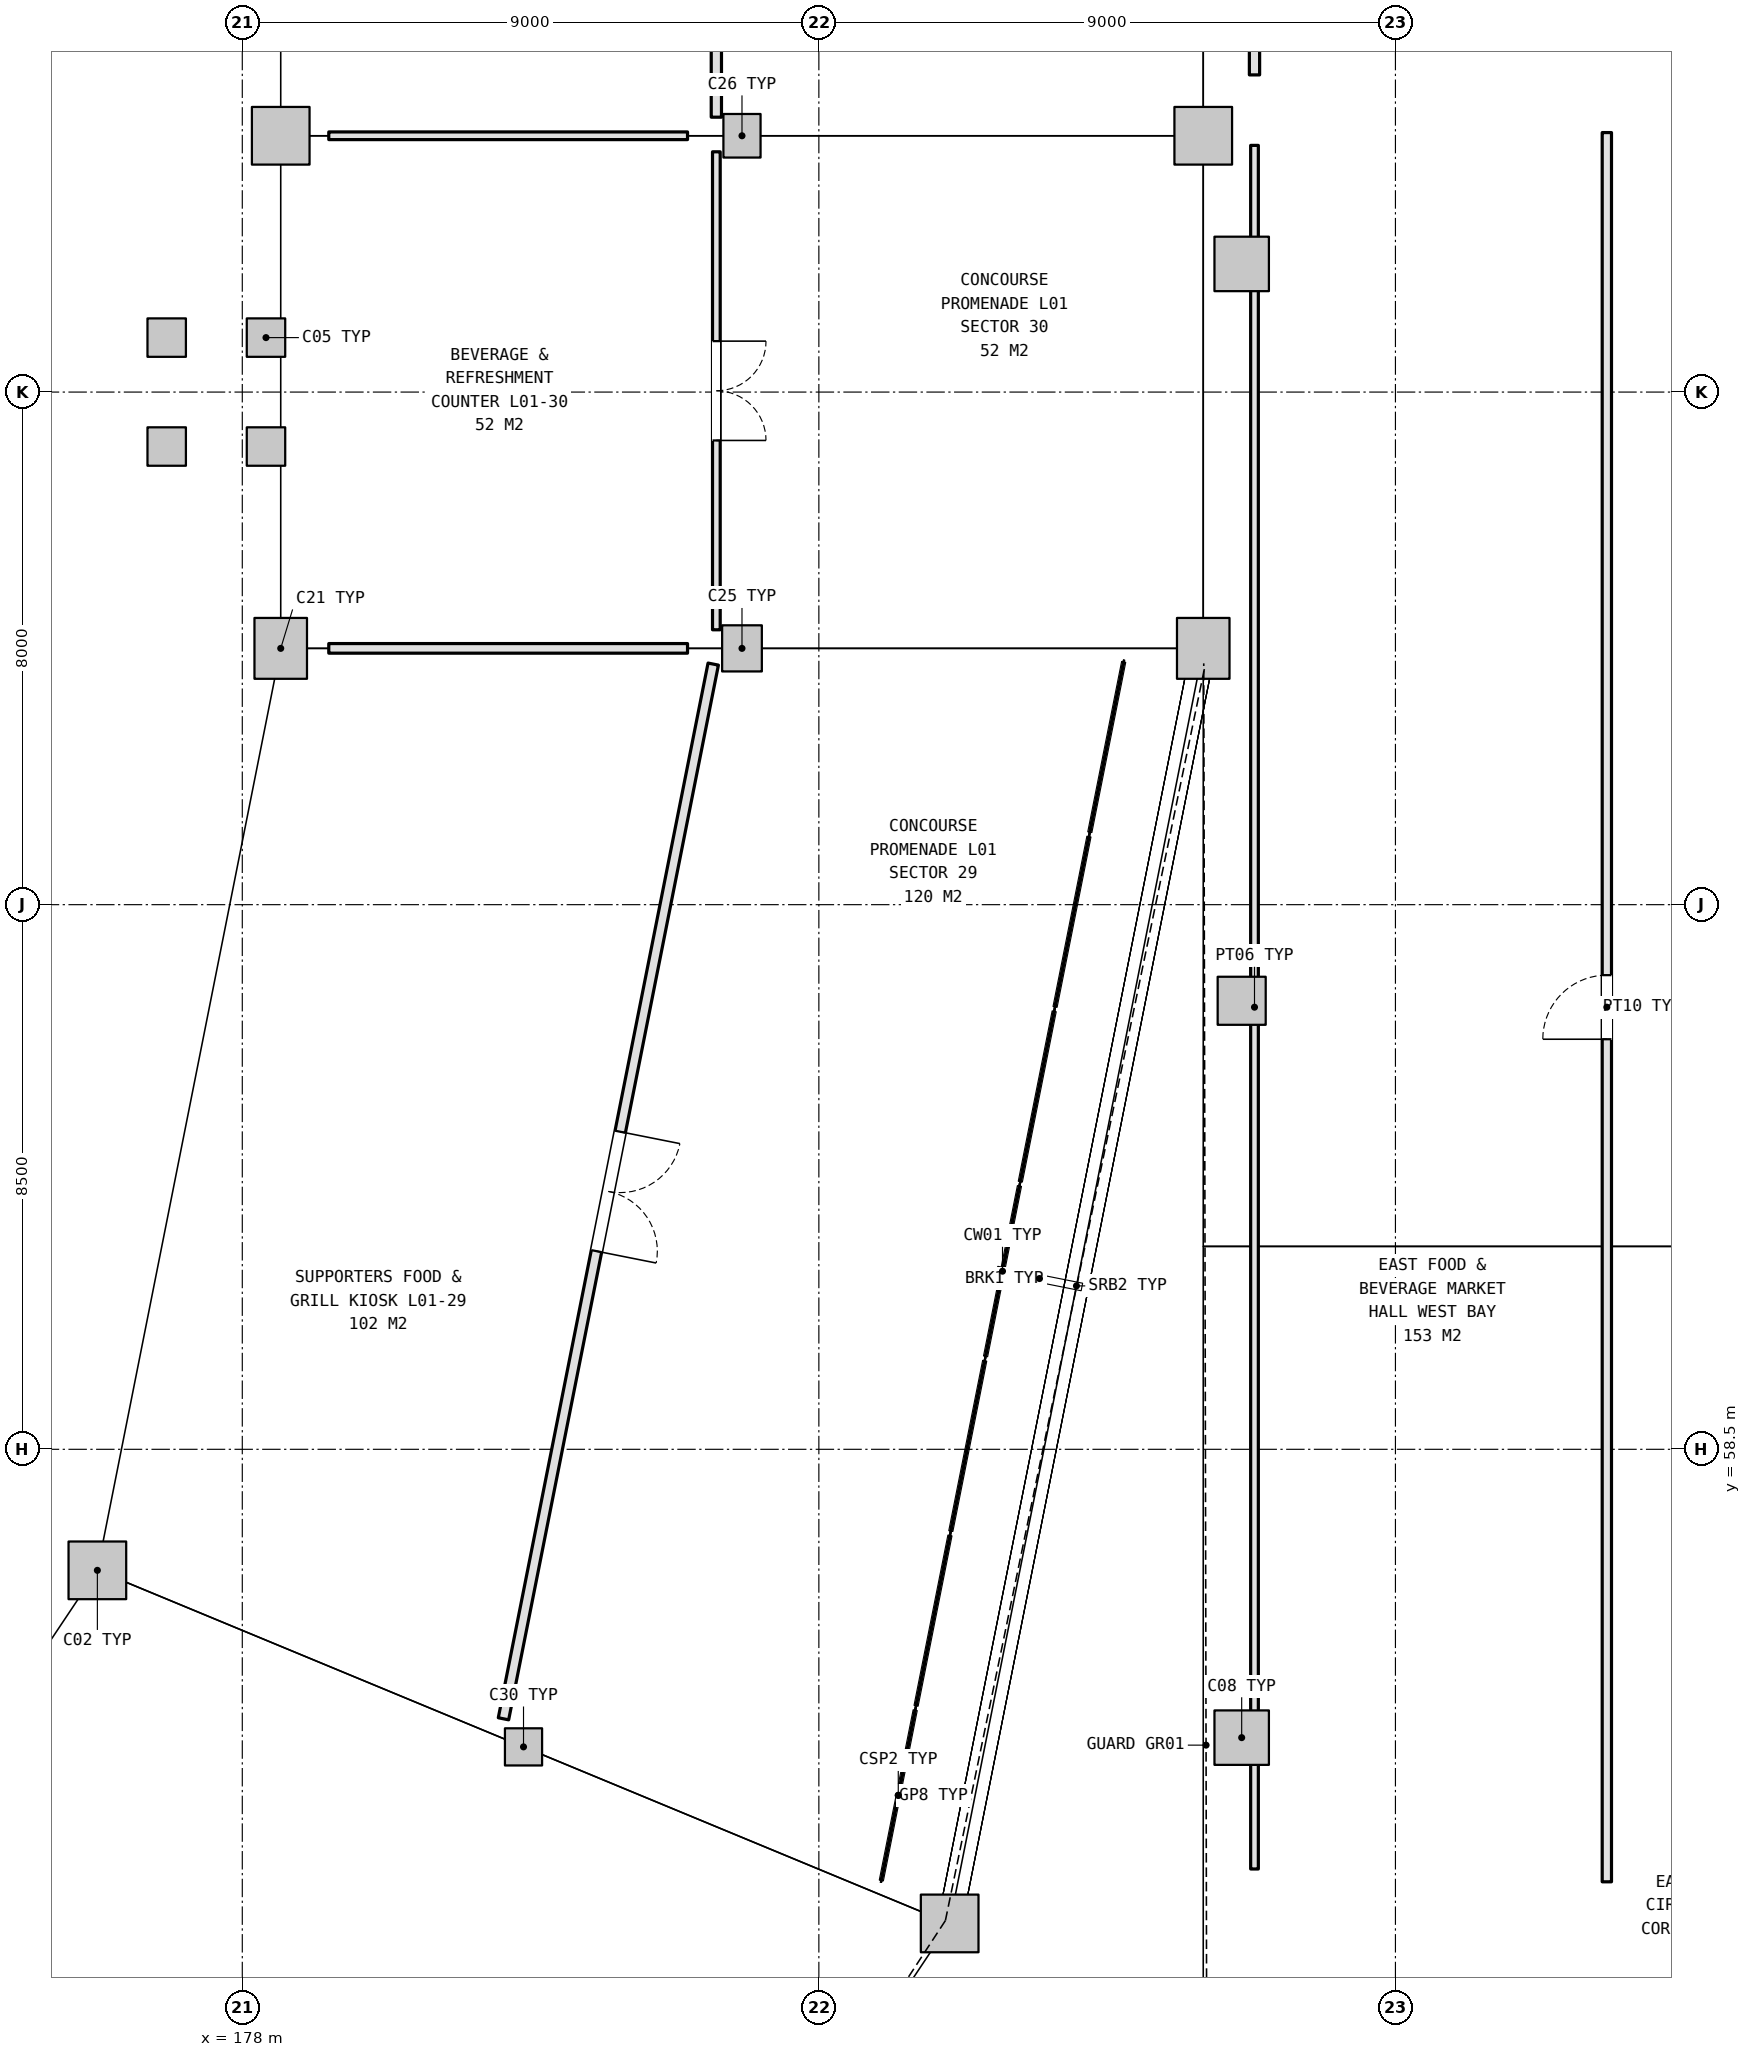
"""IFC4 building model, lengths in metres.
Left out: names, types, materials, properties, quantities, classifications, styles, units other than length and angle.
Written with IfcOpenShell. Run it as: python <this file> out.ifc"""

import sys

from ifc_helpers import new_model, si_unit, direction, frame, frame_2d, origin, origin_2d, place, context, subcontext, project, spatial, rectangle, extrude, element, fill, save


model = new_model("IFC4")
c1 = context("Model", 3, precision=1e-05, world=origin(), true_north=direction((0.0, 1.0)))
c2 = subcontext(c1, "Body", "Model", "MODEL_VIEW")
j1 = project(units=[si_unit("LENGTHUNIT", "METRE"), si_unit("PLANEANGLEUNIT", "RADIAN")], contexts=[c1])
p1 = place(None, origin())
s1 = spatial("IfcSite", under=j1, at=p1, CompositionType="ELEMENT")
p2 = place(p1, origin())
s2 = spatial("IfcBuilding", under=s1, at=p2, CompositionType="ELEMENT")
p3 = place(p2, frame((0.0, 0.0, 5.4)))
s3 = spatial("IfcBuildingStorey", under=s2, at=p3, CompositionType="ELEMENT", Elevation=5.4)
p4 = place(p3, frame((175.738, 56.611, 0.0), z_axis=(0.0, 0.0, 1.0), x_axis=(1.0, 0.0, 0.0)))
e1 = element("IfcColumn", 1, at=p4, inside=s3, PredefinedType="COLUMN", context=c2, shape_type="SweptSolid", body=[
    extrude(rectangle(XDim=0.9, YDim=0.9, at=origin_2d()), origin(), (0.0, 0.0, 1.0), 5.4),
])
p5 = place(p3, frame((182.39, 53.856, 0.0), z_axis=(0.0, 0.0, 1.0), x_axis=(1.0, 0.0, 0.0)))
e2 = element("IfcColumn", 2, at=p5, inside=s3, PredefinedType="COLUMN", context=c2, shape_type="SweptSolid", body=[
    extrude(rectangle(XDim=0.58, YDim=0.58, at=origin_2d()), origin(), (0.0, 0.0, 1.0), 5.4),
])
p6 = place(p3, frame((189.042, 51.1, 0.0), z_axis=(0.0, 0.0, 1.0), x_axis=(1.0, 0.0, 0.0)))
e3 = element("IfcColumn", 3, at=p6, inside=s3, PredefinedType="COLUMN", context=c2, shape_type="SweptSolid", body=[
    extrude(rectangle(XDim=0.9, YDim=0.9, at=origin_2d()), origin(), (0.0, 0.0, 1.0), 5.4),
])
p7 = place(p3, frame((178.6, 71.0, 0.0), z_axis=(0.0, 0.0, 1.0), x_axis=(1.0, 0.0, 0.0)))
e4 = element("IfcColumn", 4, at=p7, inside=s3, PredefinedType="COLUMN", context=c2, shape_type="SweptSolid", body=[
    extrude(rectangle(XDim=0.82, YDim=0.95, at=origin_2d()), origin(), (0.0, 0.0, 1.0), 5.4),
])
p8 = place(p3, frame((185.8, 71.0, 0.0), z_axis=(0.0, 0.0, 1.0), x_axis=(1.0, 0.0, 0.0)))
e5 = element("IfcColumn", 5, at=p8, inside=s3, PredefinedType="COLUMN", context=c2, shape_type="SweptSolid", body=[
    extrude(rectangle(XDim=0.62, YDim=0.72, at=origin_2d()), origin(), (0.0, 0.0, 1.0), 5.4),
])
p9 = place(p3, frame((193.0, 71.0, 0.0), z_axis=(0.0, 0.0, 1.0), x_axis=(1.0, 0.0, 0.0)))
e6 = element("IfcColumn", 6, at=p9, inside=s3, PredefinedType="COLUMN", context=c2, shape_type="SweptSolid", body=[
    extrude(rectangle(XDim=0.82, YDim=0.95, at=origin_2d()), origin(), (0.0, 0.0, 1.0), 5.4),
])
p10 = place(p3, frame((178.6, 79.0, 0.0), z_axis=(0.0, 0.0, 1.0), x_axis=(1.0, 0.0, 0.0)))
e7 = element("IfcColumn", 7, at=p10, inside=s3, PredefinedType="COLUMN", context=c2, shape_type="SweptSolid", body=[
    extrude(rectangle(XDim=0.9, YDim=0.9, at=origin_2d()), origin(), (0.0, 0.0, 1.0), 5.4),
])
p11 = place(p3, frame((185.8, 79.0, 0.0), z_axis=(0.0, 0.0, 1.0), x_axis=(1.0, 0.0, 0.0)))
e8 = element("IfcColumn", 8, at=p11, inside=s3, PredefinedType="COLUMN", context=c2, shape_type="SweptSolid", body=[
    extrude(rectangle(XDim=0.58, YDim=0.68, at=origin_2d()), origin(), (0.0, 0.0, 1.0), 5.4),
])
p12 = place(p3, frame((193.0, 79.0, 0.0), z_axis=(0.0, 0.0, 1.0), x_axis=(1.0, 0.0, 0.0)))
e9 = element("IfcColumn", 9, at=p12, inside=s3, PredefinedType="COLUMN", context=c2, shape_type="SweptSolid", body=[
    extrude(rectangle(XDim=0.9, YDim=0.9, at=origin_2d()), origin(), (0.0, 0.0, 1.0), 5.4),
])
p13 = place(p3, frame((193.6, 54.0, 0.0), z_axis=(0.0, 0.0, 1.0), x_axis=(1.0, 0.0, 0.0)))
e10 = element("IfcColumn", 10, at=p13, inside=s3, PredefinedType="COLUMN", context=c2, shape_type="SweptSolid", body=[
    extrude(rectangle(XDim=0.85, YDim=0.85, at=origin_2d()), origin(), (0.0, 0.0, 1.0), 5.4),
])
p14 = place(p3, frame((193.6, 65.5, 0.0), z_axis=(0.0, 0.0, 1.0), x_axis=(1.0, 0.0, 0.0)))
e11 = element("IfcColumn", 11, at=p14, inside=s3, PredefinedType="COLUMN", context=c2, shape_type="SweptSolid", body=[
    extrude(rectangle(XDim=0.75, YDim=0.75, at=origin_2d()), origin(), (0.0, 0.0, 1.0), 5.4),
])
p15 = place(p3, frame((193.6, 77.0, 0.0), z_axis=(0.0, 0.0, 1.0), x_axis=(1.0, 0.0, 0.0)))
e12 = element("IfcColumn", 12, at=p15, inside=s3, PredefinedType="COLUMN", context=c2, shape_type="SweptSolid", body=[
    extrude(rectangle(XDim=0.85, YDim=0.85, at=origin_2d()), origin(), (0.0, 0.0, 1.0), 5.4),
])
for number, where, z_axis, x_axis in (
    (13, (178.37, 75.85, 0.0), (0.0, 0.0, 1.0), (1.0, 0.0, 0.0)),
    (14, (176.82, 75.85, 0.0), (0.0, 0.0, 1.0), (1.0, 0.0, 0.0)),
    (15, (176.82, 74.15, 0.0), (0.0, 0.0, 1.0), (1.0, 0.0, 0.0)),
    (16, (178.37, 74.15, 0.0), (0.0, 0.0, 1.0), (1.0, 0.0, 0.0)),
):
    element("IfcColumn", number, at=place(p3, frame(where, z_axis=z_axis, x_axis=x_axis)), inside=s3, PredefinedType="COLUMN", context=c2, shape_type="SweptSolid", body=[
        extrude(rectangle(XDim=0.6, YDim=0.6, at=origin_2d()), origin(), (0.0, 0.0, 1.0), 5.4),
    ])
p16 = place(p3, frame((199.3, 79.05, 0.0), z_axis=(0.0, 0.0, 1.0), x_axis=(0.0, -1.0, 0.0)))
e17 = element("IfcWall", 17, at=p16, inside=s3, PredefinedType="PARTITIONING", context=c2, shape_type="SweptSolid", body=[
    extrude(rectangle(XDim=27.3, YDim=0.145, at=frame_2d((13.65, 0.0))), origin(), (0.0, 0.0, 1.0), 4.625),
])
p17 = place(p16, frame((13.15, 0.0, 0.0)))
e18 = element("IfcOpeningElement", 18, at=p17, cuts=e17, PredefinedType="OPENING", context=c2, shape_type="SweptSolid", body=[
    extrude(rectangle(XDim=1.0, YDim=2.15, at=frame_2d((0.5, 1.075))), frame((0.0, 0.083, 0.0), z_axis=(0.0, -1.0, 0.0), x_axis=(1.0, 0.0, 0.0)), (0.0, 0.0, 1.0), 0.165),
])
p18 = place(p3, frame((193.8, 51.95, 0.0), z_axis=(0.0, 0.0, 1.0), x_axis=(0.0, 1.0, 0.0)))
e19 = element("IfcWall", 19, at=p18, inside=s3, PredefinedType="PARTITIONING", context=c2, shape_type="SweptSolid", body=[
    extrude(rectangle(XDim=26.9, YDim=0.12, at=frame_2d((13.45, 0.0))), origin(), (0.0, 0.0, 1.0), 4.475),
])
p19 = place(p3, frame((193.8, 79.95, 0.0), z_axis=(0.0, 0.0, 1.0), x_axis=(0.0, 1.0, 0.0)))
e20 = element("IfcWall", 20, at=p19, inside=s3, PredefinedType="PARTITIONING", context=c2, shape_type="SweptSolid", body=[
    extrude(rectangle(XDim=20.9, YDim=0.16, at=frame_2d((10.45, 0.0))), origin(), (0.0, 0.0, 1.0), 4.475),
])
p20 = place(p3, frame((185.351, 70.755, 0.0), z_axis=(0.0, 0.0, 1.0), x_axis=(-0.195100557291, -0.980783244425, 0.0)))
e21 = element("IfcWall", 21, at=p20, inside=s3, PredefinedType="PARTITIONING", context=c2, shape_type="SweptSolid", body=[
    extrude(rectangle(XDim=16.783, YDim=0.165, at=frame_2d((8.392, 0.0))), origin(), (0.0, 0.0, 1.0), 4.365),
])
p21 = place(p20, frame((7.442, 0.0, 0.0)))
e22 = element("IfcOpeningElement", 22, at=p21, cuts=e21, PredefinedType="OPENING", context=c2, shape_type="SweptSolid", body=[
    extrude(rectangle(XDim=1.9, YDim=2.3, at=frame_2d((0.95, 1.15))), frame((0.0, 0.093, 0.0), z_axis=(0.0, -1.0, 0.0), x_axis=(1.0, 0.0, 0.0)), (0.0, 0.0, 1.0), 0.185),
])
p22 = place(p3, frame((179.35, 71.0, 0.0), z_axis=(0.0, 0.0, 1.0), x_axis=(1.0, 0.0, 0.0)))
e23 = element("IfcWall", 23, at=p22, inside=s3, PredefinedType="PARTITIONING", context=c2, shape_type="SweptSolid", body=[
    extrude(rectangle(XDim=5.6, YDim=0.15, at=frame_2d((2.8, 0.0))), origin(), (0.0, 0.0, 1.0), 4.385),
])
p23 = place(p3, frame((185.4, 78.75, 0.0), z_axis=(0.0, 0.0, 1.0), x_axis=(0.0, -1.0, 0.0)))
e24 = element("IfcWall", 24, at=p23, inside=s3, PredefinedType="PARTITIONING", context=c2, shape_type="SweptSolid", body=[
    extrude(rectangle(XDim=7.46, YDim=0.12, at=frame_2d((3.73, 0.0))), origin(), (0.0, 0.0, 1.0), 4.305),
])
p24 = place(p23, frame((2.955, 0.0, 0.0)))
e25 = element("IfcOpeningElement", 25, at=p24, cuts=e24, PredefinedType="OPENING", context=c2, shape_type="SweptSolid", body=[
    extrude(rectangle(XDim=1.55, YDim=2.15, at=frame_2d((0.775, 1.075))), frame((0.0, 0.07, 0.0), z_axis=(0.0, -1.0, 0.0), x_axis=(1.0, 0.0, 0.0)), (0.0, 0.0, 1.0), 0.14),
])
p25 = place(p3, frame((179.35, 79.0, 0.0), z_axis=(0.0, 0.0, 1.0), x_axis=(1.0, 0.0, 0.0)))
e26 = element("IfcWall", 26, at=p25, inside=s3, PredefinedType="PARTITIONING", context=c2, shape_type="SweptSolid", body=[
    extrude(rectangle(XDim=5.6, YDim=0.12, at=frame_2d((2.8, 0.0))), origin(), (0.0, 0.0, 1.0), 4.305),
])
p26 = place(p3, frame((185.4, 86.75, 0.0), z_axis=(0.0, 0.0, 1.0), x_axis=(0.0, -1.0, 0.0)))
e27 = element("IfcWall", 27, at=p26, inside=s3, PredefinedType="PARTITIONING", context=c2, shape_type="SweptSolid", body=[
    extrude(rectangle(XDim=7.46, YDim=0.16, at=frame_2d((3.73, 0.0))), origin(), (0.0, 0.0, 1.0), 4.305),
])
p27 = place(p26, frame((3.17, 0.0, 0.0)))
e28 = element("IfcOpeningElement", 28, at=p27, cuts=e27, PredefinedType="OPENING", context=c2, shape_type="SweptSolid", body=[
    extrude(rectangle(XDim=1.12, YDim=2.2, at=frame_2d((0.56, 1.1))), frame((0.0, 0.09, 0.0), z_axis=(0.0, -1.0, 0.0), x_axis=(1.0, 0.0, 0.0)), (0.0, 0.0, 1.0), 0.18),
])
p28 = place(p17, frame((1.0, 0.0, 0.0), z_axis=(0.0, 0.0, 1.0), x_axis=(-1.0, 0.0, 0.0)))
e29 = element("IfcDoor", 29, at=p28, inside=s3, OperationType="SINGLE_SWING_RIGHT", PredefinedType="DOOR", context=c2, shape_type="SweptSolid", body=[
    extrude(rectangle(XDim=1.0, YDim=2.15, at=frame_2d((0.5, 1.075))), frame((0.0, 0.025, 0.0), z_axis=(0.0, -1.0, 0.0), x_axis=(1.0, 0.0, 0.0)), (0.0, 0.0, 1.0), 0.05),
])
fill(e18, e29)
p29 = place(p21, origin())
e30 = element("IfcDoor", 30, at=p29, inside=s3, OperationType="DOUBLE_DOOR_SINGLE_SWING", PredefinedType="DOOR", context=c2, shape_type="SweptSolid", body=[
    extrude(rectangle(XDim=1.9, YDim=2.3, at=frame_2d((0.95, 1.15))), frame((0.0, 0.025, 0.0), z_axis=(0.0, -1.0, 0.0), x_axis=(1.0, 0.0, 0.0)), (0.0, 0.0, 1.0), 0.05),
])
fill(e22, e30)
p30 = place(p24, origin())
e31 = element("IfcDoor", 31, at=p30, inside=s3, OperationType="DOUBLE_DOOR_SINGLE_SWING", PredefinedType="DOOR", context=c2, shape_type="SweptSolid", body=[
    extrude(rectangle(XDim=1.55, YDim=2.15, at=frame_2d((0.775, 1.075))), frame((0.0, 0.025, 0.0), z_axis=(0.0, -1.0, 0.0), x_axis=(1.0, 0.0, 0.0)), (0.0, 0.0, 1.0), 0.05),
])
fill(e25, e31)
save(model, sys.argv[1])
